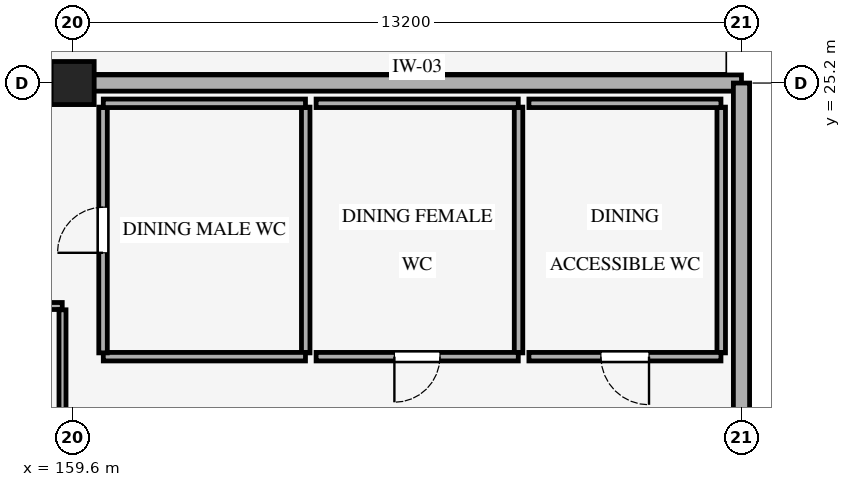
"""IFC4 building model, lengths in metres.
Left out: names, types, materials, properties, quantities, classifications, styles, units other than length and angle.
Written with IfcOpenShell. Run it as: python <this file> out.ifc"""

import sys

from ifc_helpers import new_model, si_unit, direction, frame, frame_2d, origin, origin_2d, place, context, subcontext, project, spatial, rectangle, extrude, element, fill, save


model = new_model("IFC4")
c1 = context("Model", 3, precision=1e-05, world=origin(), true_north=direction((0.0, 1.0)))
c2 = subcontext(c1, "Body", "Model", "MODEL_VIEW")
j1 = project(units=[si_unit("LENGTHUNIT", "METRE"), si_unit("PLANEANGLEUNIT", "RADIAN")], contexts=[c1])
p1 = place(None, origin())
s1 = spatial("IfcSite", under=j1, at=p1, CompositionType="ELEMENT")
p2 = place(p1, origin())
s2 = spatial("IfcBuilding", under=s1, at=p2, CompositionType="ELEMENT")
p3 = place(p2, origin())
s3 = spatial("IfcBuildingStorey", under=s2, at=p3, CompositionType="ELEMENT", Elevation=0.0)
for number, where, z_axis, x_axis in (
    (1, (159.6, 25.2, 0.0), (0.0, 0.0, 1.0), (1.0, 0.0, 0.0)),
    (2, (172.8, 25.2, 0.0), (0.0, 0.0, 1.0), (1.0, 0.0, 0.0)),
):
    element("IfcColumn", number, at=place(p3, frame(where, z_axis=z_axis, x_axis=x_axis)), inside=s3, PredefinedType="COLUMN", context=c2, shape_type="SweptSolid", body=[
        extrude(rectangle(XDim=0.85, YDim=0.85, at=origin_2d()), origin(), (0.0, 0.0, 1.0), 4.8),
    ])
p4 = place(p3, frame((146.4, 25.2, 0.0), z_axis=(0.0, 0.0, 1.0), x_axis=(1.0, 0.0, 0.0)))
e3 = element("IfcWall", 3, at=p4, inside=s3, PredefinedType="STANDARD", context=c2, shape_type="SweptSolid", body=[
    extrude(rectangle(XDim=13.2, YDim=0.32, at=frame_2d((6.6, 0.0))), origin(), (0.0, 0.0, 1.0), 3.62),
])
p5 = place(p4, frame((5.6, 0.0, 0.0)))
e4 = element("IfcOpeningElement", 4, at=p5, cuts=e3, PredefinedType="OPENING", context=c2, shape_type="SweptSolid", body=[
    extrude(rectangle(XDim=2.0, YDim=2.4, at=frame_2d((1.0, 1.2))), frame((0.0, 0.17, 0.0), z_axis=(0.0, -1.0, 0.0), x_axis=(1.0, 0.0, 0.0)), (0.0, 0.0, 1.0), 0.34),
])
p6 = place(p3, frame((159.6, 25.2, 0.0), z_axis=(0.0, 0.0, 1.0), x_axis=(1.0, 0.0, 0.0)))
e5 = element("IfcWall", 5, at=p6, inside=s3, PredefinedType="STANDARD", context=c2, shape_type="SweptSolid", body=[
    extrude(rectangle(XDim=13.2, YDim=0.32, at=frame_2d((6.6, 0.0))), origin(), (0.0, 0.0, 1.0), 3.62),
])
p7 = place(p3, frame((172.8, 25.2, 0.0), z_axis=(0.0, 0.0, 1.0), x_axis=(0.0, -1.0, 0.0)))
e6 = element("IfcWall", 6, at=p7, inside=s3, PredefinedType="STANDARD", context=c2, shape_type="SweptSolid", body=[
    extrude(rectangle(XDim=8.4, YDim=0.32, at=frame_2d((4.2, 0.0))), origin(), (0.0, 0.0, 1.0), 3.67),
])
p8 = place(p3, frame((123.805, 20.8, 0.0), z_axis=(0.0, 0.0, 1.0), x_axis=(1.0, 0.0, 0.0)))
e7 = element("IfcWall", 7, at=p8, inside=s3, PredefinedType="STANDARD", context=c2, shape_type="SweptSolid", body=[
    extrude(rectangle(XDim=35.59, YDim=0.138, at=frame_2d((17.795, 0.0))), origin(), (0.0, 0.0, 1.0), 3.62),
])
p9 = place(p8, frame((17.27, 0.0, 0.0)))
e8 = element("IfcOpeningElement", 8, at=p9, cuts=e7, PredefinedType="OPENING", context=c2, shape_type="SweptSolid", body=[
    extrude(rectangle(XDim=1.05, YDim=2.15, at=frame_2d((0.525, 1.075))), frame((0.0, 0.079, 0.0), z_axis=(0.0, -1.0, 0.0), x_axis=(1.0, 0.0, 0.0)), (0.0, 0.0, 1.0), 0.158),
])
p10 = place(p3, frame((159.4, 20.725, 0.0), z_axis=(0.0, 0.0, 1.0), x_axis=(0.0, -1.0, 0.0)))
e9 = element("IfcWall", 9, at=p10, inside=s3, PredefinedType="STANDARD", context=c2, shape_type="SweptSolid", body=[
    extrude(rectangle(XDim=12.05, YDim=0.138, at=frame_2d((6.025, 0.0))), origin(), (0.0, 0.0, 1.0), 3.27),
])
p11 = place(p3, frame((164.2, 24.725, 0.0), z_axis=(0.0, 0.0, 1.0), x_axis=(0.0, -1.0, 0.0)))
e10 = element("IfcWall", 10, at=p11, inside=s3, PredefinedType="STANDARD", context=c2, shape_type="SweptSolid", body=[
    extrude(rectangle(XDim=4.85, YDim=0.168, at=frame_2d((2.425, 0.0))), origin(), (0.0, 0.0, 1.0), 4.49),
])
p12 = place(p3, frame((164.195, 19.8, 0.0), z_axis=(0.0, 0.0, 1.0), x_axis=(-1.0, 0.0, 0.0)))
e11 = element("IfcWall", 11, at=p12, inside=s3, PredefinedType="STANDARD", context=c2, shape_type="SweptSolid", body=[
    extrude(rectangle(XDim=3.99, YDim=0.168, at=frame_2d((1.995, 0.0))), origin(), (0.0, 0.0, 1.0), 4.49),
])
p13 = place(p3, frame((160.2, 19.875, 0.0), z_axis=(0.0, 0.0, 1.0), x_axis=(0.0, 1.0, 0.0)))
e12 = element("IfcWall", 12, at=p13, inside=s3, PredefinedType="STANDARD", context=c2, shape_type="SweptSolid", body=[
    extrude(rectangle(XDim=4.85, YDim=0.168, at=frame_2d((2.425, 0.0))), origin(), (0.0, 0.0, 1.0), 4.49),
])
p14 = place(p13, frame((1.975, 0.0, 0.0)))
e13 = element("IfcOpeningElement", 13, at=p14, cuts=e12, PredefinedType="OPENING", context=c2, shape_type="SweptSolid", body=[
    extrude(rectangle(XDim=0.9, YDim=2.1, at=frame_2d((0.45, 1.05))), frame((0.0, 0.094, 0.0), z_axis=(0.0, -1.0, 0.0), x_axis=(1.0, 0.0, 0.0)), (0.0, 0.0, 1.0), 0.188),
])
p15 = place(p3, frame((160.205, 24.8, 0.0), z_axis=(0.0, 0.0, 1.0), x_axis=(1.0, 0.0, 0.0)))
e14 = element("IfcWall", 14, at=p15, inside=s3, PredefinedType="STANDARD", context=c2, shape_type="SweptSolid", body=[
    extrude(rectangle(XDim=3.99, YDim=0.168, at=frame_2d((1.995, 0.0))), origin(), (0.0, 0.0, 1.0), 4.49),
])
p16 = place(p3, frame((168.4, 24.725, 0.0), z_axis=(0.0, 0.0, 1.0), x_axis=(0.0, -1.0, 0.0)))
e15 = element("IfcWall", 15, at=p16, inside=s3, PredefinedType="STANDARD", context=c2, shape_type="SweptSolid", body=[
    extrude(rectangle(XDim=4.85, YDim=0.168, at=frame_2d((2.425, 0.0))), origin(), (0.0, 0.0, 1.0), 4.49),
])
p17 = place(p3, frame((168.395, 19.8, 0.0), z_axis=(0.0, 0.0, 1.0), x_axis=(-1.0, 0.0, 0.0)))
e16 = element("IfcWall", 16, at=p17, inside=s3, PredefinedType="STANDARD", context=c2, shape_type="SweptSolid", body=[
    extrude(rectangle(XDim=3.99, YDim=0.168, at=frame_2d((1.995, 0.0))), origin(), (0.0, 0.0, 1.0), 4.49),
])
p18 = place(p17, frame((1.545, 0.0, 0.0)))
e17 = element("IfcOpeningElement", 17, at=p18, cuts=e16, PredefinedType="OPENING", context=c2, shape_type="SweptSolid", body=[
    extrude(rectangle(XDim=0.9, YDim=2.1, at=frame_2d((0.45, 1.05))), frame((0.0, 0.094, 0.0), z_axis=(0.0, -1.0, 0.0), x_axis=(1.0, 0.0, 0.0)), (0.0, 0.0, 1.0), 0.188),
])
p19 = place(p3, frame((164.405, 24.8, 0.0), z_axis=(0.0, 0.0, 1.0), x_axis=(1.0, 0.0, 0.0)))
e18 = element("IfcWall", 18, at=p19, inside=s3, PredefinedType="STANDARD", context=c2, shape_type="SweptSolid", body=[
    extrude(rectangle(XDim=3.99, YDim=0.168, at=frame_2d((1.995, 0.0))), origin(), (0.0, 0.0, 1.0), 4.49),
])
p20 = place(p3, frame((172.4, 24.725, 0.0), z_axis=(0.0, 0.0, 1.0), x_axis=(0.0, -1.0, 0.0)))
e19 = element("IfcWall", 19, at=p20, inside=s3, PredefinedType="STANDARD", context=c2, shape_type="SweptSolid", body=[
    extrude(rectangle(XDim=4.85, YDim=0.168, at=frame_2d((2.425, 0.0))), origin(), (0.0, 0.0, 1.0), 3.67),
])
p21 = place(p3, frame((172.395, 19.8, 0.0), z_axis=(0.0, 0.0, 1.0), x_axis=(-1.0, 0.0, 0.0)))
e20 = element("IfcWall", 20, at=p21, inside=s3, PredefinedType="STANDARD", context=c2, shape_type="SweptSolid", body=[
    extrude(rectangle(XDim=3.79, YDim=0.168, at=frame_2d((1.895, 0.0))), origin(), (0.0, 0.0, 1.0), 3.67),
])
p22 = place(p21, frame((1.42, 0.0, 0.0)))
e21 = element("IfcOpeningElement", 21, at=p22, cuts=e20, PredefinedType="OPENING", context=c2, shape_type="SweptSolid", body=[
    extrude(rectangle(XDim=0.95, YDim=2.1, at=frame_2d((0.475, 1.05))), frame((0.0, 0.094, 0.0), z_axis=(0.0, -1.0, 0.0), x_axis=(1.0, 0.0, 0.0)), (0.0, 0.0, 1.0), 0.188),
])
p23 = place(p3, frame((168.605, 24.8, 0.0), z_axis=(0.0, 0.0, 1.0), x_axis=(1.0, 0.0, 0.0)))
e22 = element("IfcWall", 22, at=p23, inside=s3, PredefinedType="STANDARD", context=c2, shape_type="SweptSolid", body=[
    extrude(rectangle(XDim=3.79, YDim=0.168, at=frame_2d((1.895, 0.0))), origin(), (0.0, 0.0, 1.0), 3.67),
])
p24 = place(p14, origin())
e23 = element("IfcDoor", 23, at=p24, inside=s3, OperationType="SINGLE_SWING_LEFT", PredefinedType="DOOR", context=c2, shape_type="SweptSolid", body=[
    extrude(rectangle(XDim=0.9, YDim=2.1, at=frame_2d((0.45, 1.05))), frame((0.0, 0.025, 0.0), z_axis=(0.0, -1.0, 0.0), x_axis=(1.0, 0.0, 0.0)), (0.0, 0.0, 1.0), 0.05),
])
fill(e13, e23)
p25 = place(p18, origin())
e24 = element("IfcDoor", 24, at=p25, inside=s3, OperationType="SINGLE_SWING_RIGHT", PredefinedType="DOOR", context=c2, shape_type="SweptSolid", body=[
    extrude(rectangle(XDim=0.9, YDim=2.1, at=frame_2d((0.45, 1.05))), frame((0.0, 0.025, 0.0), z_axis=(0.0, -1.0, 0.0), x_axis=(1.0, 0.0, 0.0)), (0.0, 0.0, 1.0), 0.05),
])
fill(e17, e24)
p26 = place(p22, origin())
e25 = element("IfcDoor", 25, at=p26, inside=s3, OperationType="SINGLE_SWING_LEFT", PredefinedType="DOOR", context=c2, shape_type="SweptSolid", body=[
    extrude(rectangle(XDim=0.95, YDim=2.1, at=frame_2d((0.475, 1.05))), frame((0.0, 0.025, 0.0), z_axis=(0.0, -1.0, 0.0), x_axis=(1.0, 0.0, 0.0)), (0.0, 0.0, 1.0), 0.05),
])
fill(e21, e25)
save(model, sys.argv[1])
